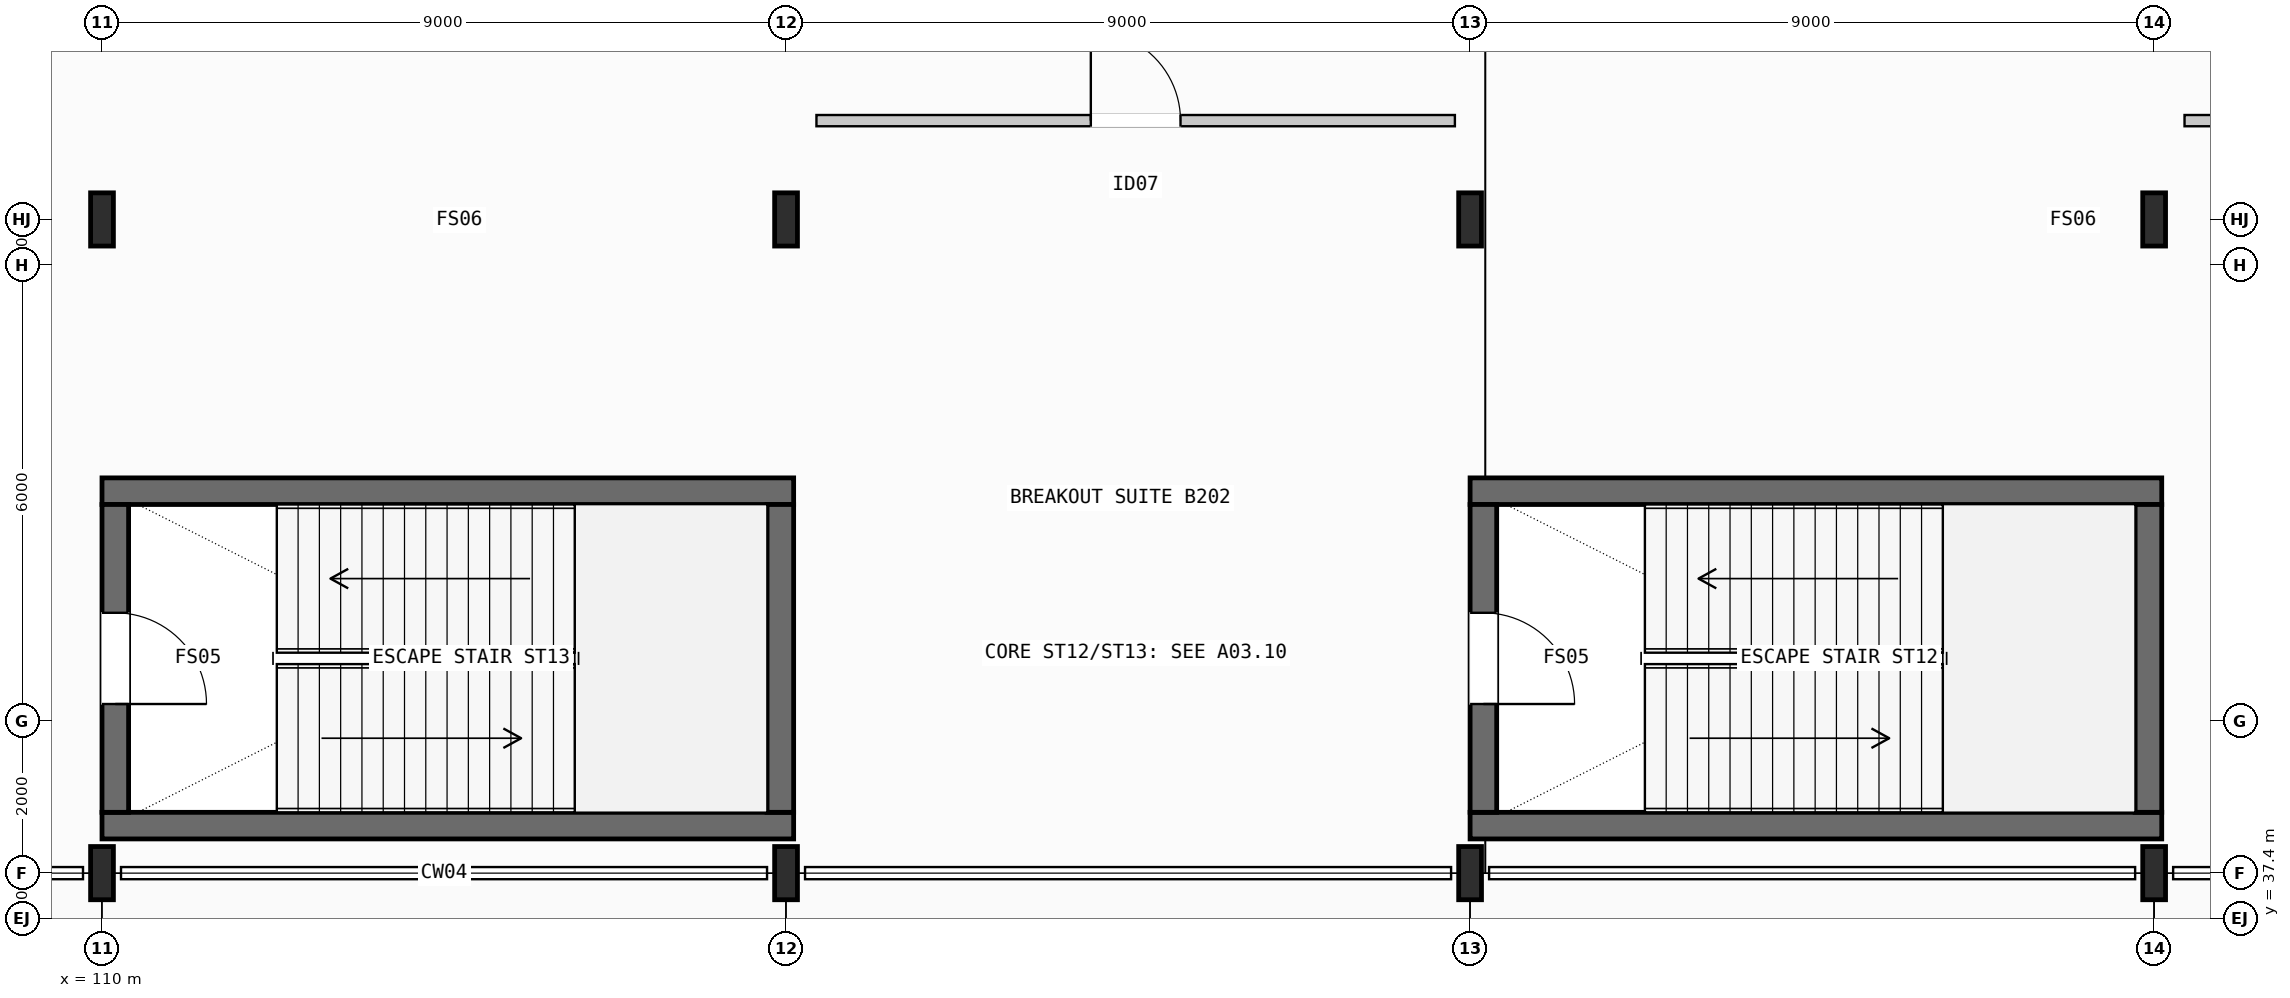
"""IFC4 building model, lengths in metres.
Left out: names, types, materials, properties, quantities, classifications, styles, units other than length and angle.
Written with IfcOpenShell. Run it as: python <this file> out.ifc"""

import sys

from ifc_helpers import new_model, si_unit, direction, frame, frame_2d, origin, origin_2d, place, context, subcontext, project, spatial, rectangle, i_section, extrude, element, fill, save


model = new_model("IFC4")
c1 = context("Model", 3, precision=1e-05, world=origin(), true_north=direction((0.0, 1.0)))
c2 = subcontext(c1, "Body", "Model", "MODEL_VIEW")
j1 = project(units=[si_unit("LENGTHUNIT", "METRE"), si_unit("PLANEANGLEUNIT", "RADIAN")], contexts=[c1])
p1 = place(None, origin())
s1 = spatial("IfcSite", under=j1, at=p1, CompositionType="ELEMENT")
p2 = place(p1, origin())
s2 = spatial("IfcBuilding", under=s1, at=p2, CompositionType="ELEMENT")
p3 = place(p2, frame((0.0, 0.0, 11.4)))
s3 = spatial("IfcBuildingStorey", under=s2, at=p3, CompositionType="ELEMENT", Elevation=11.4)
for number, where, z_axis, x_axis in (
    (1, (110.0, 38.0, 0.0), (0.0, 0.0, 1.0), (1.0, 0.0, 0.0)),
    (2, (110.0, 46.6, 0.0), (0.0, 0.0, 1.0), (1.0, 0.0, 0.0)),
    (3, (119.0, 38.0, 0.0), (0.0, 0.0, 1.0), (1.0, 0.0, 0.0)),
    (4, (119.0, 46.6, 0.0), (0.0, 0.0, 1.0), (1.0, 0.0, 0.0)),
    (5, (128.0, 38.0, 0.0), (0.0, 0.0, 1.0), (1.0, 0.0, 0.0)),
    (6, (128.0, 46.6, 0.0), (0.0, 0.0, 1.0), (1.0, 0.0, 0.0)),
    (7, (137.0, 38.0, 0.0), (0.0, 0.0, 1.0), (1.0, 0.0, 0.0)),
    (8, (137.0, 46.6, 0.0), (0.0, 0.0, 1.0), (1.0, 0.0, 0.0)),
):
    element("IfcColumn", number, at=place(p3, frame(where, z_axis=z_axis, x_axis=x_axis)), inside=s3, PredefinedType="COLUMN", context=c2, shape_type="SweptSolid", body=[
        extrude(i_section(OverallWidth=0.3, OverallDepth=0.7, WebThickness=0.017, FlangeThickness=0.032, FilletRadius=0.027, at=origin_2d()), origin(), (0.0, 0.0, 1.0), 5.4),
    ])
for number, where, z_axis, x_axis in (
    (9, (128.0, 38.625, 0.0), (0.0, 0.0, 1.0), (1.0, 0.0, 0.0)),
    (10, (128.0, 43.025, 0.0), (0.0, 0.0, 1.0), (1.0, 0.0, 0.0)),
):
    element("IfcWall", number, at=place(p3, frame(where, z_axis=z_axis, x_axis=x_axis)), inside=s3, PredefinedType="SHEAR", context=c2, shape_type="SweptSolid", body=[
        extrude(rectangle(XDim=9.1, YDim=0.35, at=frame_2d((4.55, 0.0))), origin(), (0.0, 0.0, 1.0), 5.4),
    ])
p4 = place(p3, frame((128.175, 38.8, 0.0), z_axis=(0.0, 0.0, 1.0), x_axis=(0.0, 1.0, 0.0)))
e11 = element("IfcWall", 11, at=p4, inside=s3, PredefinedType="SHEAR", context=c2, shape_type="SweptSolid", body=[
    extrude(rectangle(XDim=4.05, YDim=0.35, at=frame_2d((2.025, 0.0))), origin(), (0.0, 0.0, 1.0), 5.4),
])
p5 = place(p4, frame((1.425, 0.0, 0.0)))
e12 = element("IfcOpeningElement", 12, at=p5, cuts=e11, PredefinedType="OPENING", context=c2, shape_type="SweptSolid", body=[
    extrude(rectangle(XDim=1.2, YDim=2.2, at=frame_2d((0.6, 1.1))), frame((0.0, 0.185, 0.0), z_axis=(0.0, -1.0, 0.0), x_axis=(1.0, 0.0, 0.0)), (0.0, 0.0, 1.0), 0.37),
])
p6 = place(p3, frame((136.925, 38.8, 0.0), z_axis=(0.0, 0.0, 1.0), x_axis=(0.0, 1.0, 0.0)))
e13 = element("IfcWall", 13, at=p6, inside=s3, PredefinedType="SHEAR", context=c2, shape_type="SweptSolid", body=[
    extrude(rectangle(XDim=4.05, YDim=0.35, at=frame_2d((2.025, 0.0))), origin(), (0.0, 0.0, 1.0), 5.4),
])
for number, where, z_axis, x_axis in (
    (14, (110.0, 38.625, 0.0), (0.0, 0.0, 1.0), (1.0, 0.0, 0.0)),
    (15, (110.0, 43.025, 0.0), (0.0, 0.0, 1.0), (1.0, 0.0, 0.0)),
):
    element("IfcWall", number, at=place(p3, frame(where, z_axis=z_axis, x_axis=x_axis)), inside=s3, PredefinedType="SHEAR", context=c2, shape_type="SweptSolid", body=[
        extrude(rectangle(XDim=9.1, YDim=0.35, at=frame_2d((4.55, 0.0))), origin(), (0.0, 0.0, 1.0), 5.4),
    ])
p7 = place(p3, frame((110.175, 38.8, 0.0), z_axis=(0.0, 0.0, 1.0), x_axis=(0.0, 1.0, 0.0)))
e16 = element("IfcWall", 16, at=p7, inside=s3, PredefinedType="SHEAR", context=c2, shape_type="SweptSolid", body=[
    extrude(rectangle(XDim=4.05, YDim=0.35, at=frame_2d((2.025, 0.0))), origin(), (0.0, 0.0, 1.0), 5.4),
])
p8 = place(p7, frame((1.425, 0.0, 0.0)))
e17 = element("IfcOpeningElement", 17, at=p8, cuts=e16, PredefinedType="OPENING", context=c2, shape_type="SweptSolid", body=[
    extrude(rectangle(XDim=1.2, YDim=2.2, at=frame_2d((0.6, 1.1))), frame((0.0, 0.185, 0.0), z_axis=(0.0, -1.0, 0.0), x_axis=(1.0, 0.0, 0.0)), (0.0, 0.0, 1.0), 0.37),
])
p9 = place(p3, frame((118.925, 38.8, 0.0), z_axis=(0.0, 0.0, 1.0), x_axis=(0.0, 1.0, 0.0)))
e18 = element("IfcWall", 18, at=p9, inside=s3, PredefinedType="SHEAR", context=c2, shape_type="SweptSolid", body=[
    extrude(rectangle(XDim=4.05, YDim=0.35, at=frame_2d((2.025, 0.0))), origin(), (0.0, 0.0, 1.0), 5.4),
])
p10 = place(p3, frame((119.4, 47.9, 0.0), z_axis=(0.0, 0.0, 1.0), x_axis=(1.0, 0.0, 0.0)))
e19 = element("IfcWall", 19, at=p10, inside=s3, PredefinedType="PARTITIONING", context=c2, shape_type="SweptSolid", body=[
    extrude(rectangle(XDim=8.4, YDim=0.148, at=frame_2d((4.2, 0.0))), origin(), (0.0, 0.0, 1.0), 4.4),
])
p11 = place(p10, frame((3.61, 0.0, 0.0)))
e20 = element("IfcOpeningElement", 20, at=p11, cuts=e19, PredefinedType="OPENING", context=c2, shape_type="SweptSolid", body=[
    extrude(rectangle(XDim=1.18, YDim=2.25, at=frame_2d((0.59, 1.125))), frame((0.0, 0.084, 0.0), z_axis=(0.0, -1.0, 0.0), x_axis=(1.0, 0.0, 0.0)), (0.0, 0.0, 1.0), 0.168),
])
p12 = place(p3, frame((137.4, 47.9, 0.0), z_axis=(0.0, 0.0, 1.0), x_axis=(1.0, 0.0, 0.0)))
e21 = element("IfcWall", 21, at=p12, inside=s3, PredefinedType="PARTITIONING", context=c2, shape_type="SweptSolid", body=[
    extrude(rectangle(XDim=8.0, YDim=0.148, at=frame_2d((4.0, 0.0))), origin(), (0.0, 0.0, 1.0), 4.4),
])
p13 = place(p12, frame((3.55, 0.0, 0.0)))
e22 = element("IfcOpeningElement", 22, at=p13, cuts=e21, PredefinedType="OPENING", context=c2, shape_type="SweptSolid", body=[
    extrude(rectangle(XDim=0.9, YDim=2.08, at=frame_2d((0.45, 1.04))), frame((0.0, 0.084, 0.0), z_axis=(0.0, -1.0, 0.0), x_axis=(1.0, 0.0, 0.0)), (0.0, 0.0, 1.0), 0.168),
])
p14 = place(p5, frame((1.2, 0.0, 0.0), z_axis=(0.0, 0.0, 1.0), x_axis=(-1.0, 0.0, 0.0)))
e23 = element("IfcDoor", 23, at=p14, inside=s3, OperationType="SINGLE_SWING_RIGHT", PredefinedType="DOOR", context=c2, shape_type="SweptSolid", body=[
    extrude(rectangle(XDim=1.2, YDim=2.2, at=frame_2d((0.6, 1.1))), frame((0.0, 0.025, 0.0), z_axis=(0.0, -1.0, 0.0), x_axis=(1.0, 0.0, 0.0)), (0.0, 0.0, 1.0), 0.05),
])
fill(e12, e23)
p15 = place(p8, frame((1.2, 0.0, 0.0), z_axis=(0.0, 0.0, 1.0), x_axis=(-1.0, 0.0, 0.0)))
e24 = element("IfcDoor", 24, at=p15, inside=s3, OperationType="SINGLE_SWING_RIGHT", PredefinedType="DOOR", context=c2, shape_type="SweptSolid", body=[
    extrude(rectangle(XDim=1.2, YDim=2.2, at=frame_2d((0.6, 1.1))), frame((0.0, 0.025, 0.0), z_axis=(0.0, -1.0, 0.0), x_axis=(1.0, 0.0, 0.0)), (0.0, 0.0, 1.0), 0.05),
])
fill(e17, e24)
p16 = place(p11, origin())
e25 = element("IfcDoor", 25, at=p16, inside=s3, OperationType="SINGLE_SWING_LEFT", PredefinedType="DOOR", context=c2, shape_type="SweptSolid", body=[
    extrude(rectangle(XDim=1.18, YDim=2.25, at=frame_2d((0.59, 1.125))), frame((0.0, 0.025, 0.0), z_axis=(0.0, -1.0, 0.0), x_axis=(1.0, 0.0, 0.0)), (0.0, 0.0, 1.0), 0.05),
])
fill(e20, e25)
save(model, sys.argv[1])
